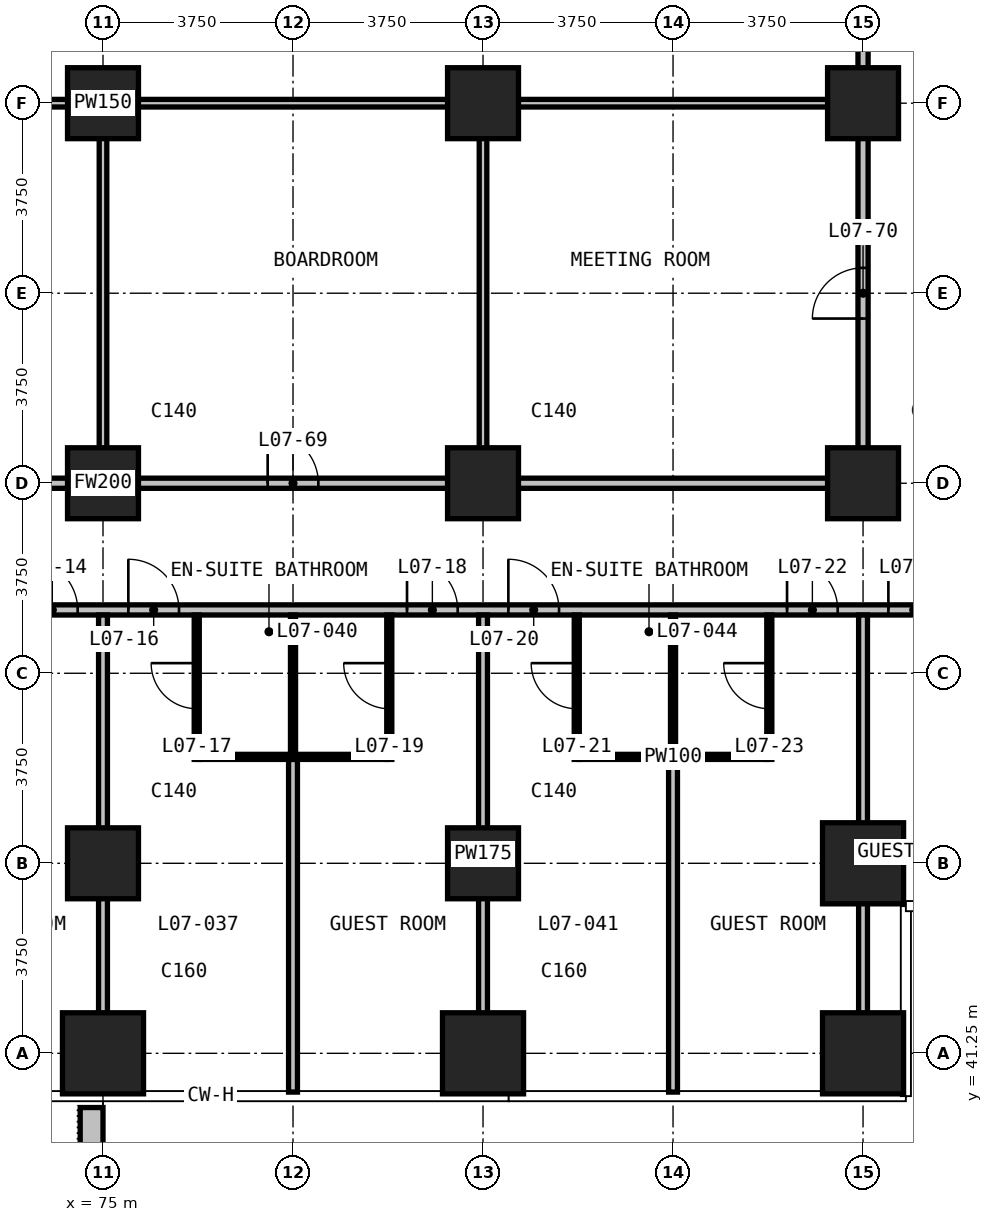
"""IFC4 building model, lengths in metres.
Left out: names, types, materials, properties, quantities, classifications, styles, units other than length and angle.
Written with IfcOpenShell. Run it as: python <this file> out.ifc"""

import sys

from ifc_helpers import new_model, si_unit, direction, frame, frame_2d, origin, origin_2d, place, context, subcontext, project, spatial, rectangle, extrude, element, fill, save


model = new_model("IFC4")
c1 = context("Model", 3, precision=1e-05, world=origin(), true_north=direction((0.0, 1.0)))
c2 = subcontext(c1, "Body", "Model", "MODEL_VIEW")
j1 = project(units=[si_unit("LENGTHUNIT", "METRE"), si_unit("PLANEANGLEUNIT", "RADIAN")], contexts=[c1])
p1 = place(None, origin())
s1 = spatial("IfcSite", under=j1, at=p1, CompositionType="ELEMENT")
p2 = place(p1, origin())
s2 = spatial("IfcBuilding", under=s1, at=p2, CompositionType="ELEMENT")
p3 = place(p2, frame((0.0, 0.0, 42.8)))
s3 = spatial("IfcBuildingStorey", under=s2, at=p3, CompositionType="ELEMENT", Elevation=42.8)
p4 = place(p3, frame((75.0, 41.25, 0.0), z_axis=(0.0, 0.0, 1.0), x_axis=(1.0, 0.0, 0.0)))
e1 = element("IfcColumn", 1, at=p4, inside=s3, PredefinedType="COLUMN", context=c2, shape_type="SweptSolid", body=[
    extrude(rectangle(XDim=1.6, YDim=1.6, at=origin_2d()), origin(), (0.0, 0.0, 1.0), 3.3),
])
for number, where, z_axis, x_axis in (
    (2, (75.0, 45.0, 0.0), (0.0, 0.0, 1.0), (1.0, 0.0, 0.0)),
    (3, (75.0, 52.5, 0.0), (0.0, 0.0, 1.0), (1.0, 0.0, 0.0)),
    (4, (75.0, 60.0, 0.0), (0.0, 0.0, 1.0), (1.0, 0.0, 0.0)),
):
    element("IfcColumn", number, at=place(p3, frame(where, z_axis=z_axis, x_axis=x_axis)), inside=s3, PredefinedType="COLUMN", context=c2, shape_type="SweptSolid", body=[
        extrude(rectangle(XDim=1.4, YDim=1.4, at=origin_2d()), origin(), (0.0, 0.0, 1.0), 3.3),
    ])
p5 = place(p3, frame((82.5, 41.25, 0.0), z_axis=(0.0, 0.0, 1.0), x_axis=(1.0, 0.0, 0.0)))
e5 = element("IfcColumn", 5, at=p5, inside=s3, PredefinedType="COLUMN", context=c2, shape_type="SweptSolid", body=[
    extrude(rectangle(XDim=1.6, YDim=1.6, at=origin_2d()), origin(), (0.0, 0.0, 1.0), 3.3),
])
for number, where, z_axis, x_axis in (
    (6, (82.5, 45.0, 0.0), (0.0, 0.0, 1.0), (1.0, 0.0, 0.0)),
    (7, (82.5, 52.5, 0.0), (0.0, 0.0, 1.0), (1.0, 0.0, 0.0)),
    (8, (82.5, 60.0, 0.0), (0.0, 0.0, 1.0), (1.0, 0.0, 0.0)),
):
    element("IfcColumn", number, at=place(p3, frame(where, z_axis=z_axis, x_axis=x_axis)), inside=s3, PredefinedType="COLUMN", context=c2, shape_type="SweptSolid", body=[
        extrude(rectangle(XDim=1.4, YDim=1.4, at=origin_2d()), origin(), (0.0, 0.0, 1.0), 3.3),
    ])
for number, where, z_axis, x_axis in (
    (9, (90.0, 41.25, 0.0), (0.0, 0.0, 1.0), (1.0, 0.0, 0.0)),
    (10, (90.0, 45.0, 0.0), (0.0, 0.0, 1.0), (1.0, 0.0, 0.0)),
):
    element("IfcColumn", number, at=place(p3, frame(where, z_axis=z_axis, x_axis=x_axis)), inside=s3, PredefinedType="COLUMN", context=c2, shape_type="SweptSolid", body=[
        extrude(rectangle(XDim=1.6, YDim=1.6, at=origin_2d()), origin(), (0.0, 0.0, 1.0), 3.3),
    ])
for number, where, z_axis, x_axis in (
    (11, (90.0, 52.5, 0.0), (0.0, 0.0, 1.0), (1.0, 0.0, 0.0)),
    (12, (90.0, 60.0, 0.0), (0.0, 0.0, 1.0), (1.0, 0.0, 0.0)),
):
    element("IfcColumn", number, at=place(p3, frame(where, z_axis=z_axis, x_axis=x_axis)), inside=s3, PredefinedType="COLUMN", context=c2, shape_type="SweptSolid", body=[
        extrude(rectangle(XDim=1.4, YDim=1.4, at=origin_2d()), origin(), (0.0, 0.0, 1.0), 3.3),
    ])
p6 = place(p3, frame((74.775, 40.18, 0.0), z_axis=(0.0, 0.0, 1.0), x_axis=(0.0, -1.0, 0.0)))
e13 = element("IfcWall", 13, at=p6, inside=s3, PredefinedType="USERDEFINED", context=c2, shape_type="SweptSolid", body=[
    extrude(rectangle(XDim=2.33, YDim=0.45, at=frame_2d((1.165, 0.0))), origin(), (0.0, 0.0, 1.0), 1.1),
])
p7 = place(p3, frame((52.575, 50.0, 0.0), z_axis=(0.0, 0.0, 1.0), x_axis=(1.0, 0.0, 0.0)))
e14 = element("IfcWall", 14, at=p7, inside=s3, PredefinedType="PARTITIONING", context=c2, shape_type="SweptSolid", body=[
    extrude(rectangle(XDim=44.85, YDim=0.2, at=frame_2d((22.425, 0.0))), origin(), (0.0, 0.0, 1.0), 3.0),
])
p8 = place(p7, frame((5.925, 0.0, 0.0)))
e15 = element("IfcOpeningElement", 15, at=p8, cuts=e14, PredefinedType="OPENING", context=c2, shape_type="SweptSolid", body=[
    extrude(rectangle(XDim=1.0, YDim=2.2, at=frame_2d((0.5, 1.1))), frame((0.0, 0.11, 0.0), z_axis=(0.0, -1.0, 0.0), x_axis=(1.0, 0.0, 0.0)), (0.0, 0.0, 1.0), 0.22),
])
p9 = place(p7, frame((7.925, 0.0, 0.0)))
e16 = element("IfcOpeningElement", 16, at=p9, cuts=e14, PredefinedType="OPENING", context=c2, shape_type="SweptSolid", body=[
    extrude(rectangle(XDim=1.0, YDim=2.2, at=frame_2d((0.5, 1.1))), frame((0.0, 0.11, 0.0), z_axis=(0.0, -1.0, 0.0), x_axis=(1.0, 0.0, 0.0)), (0.0, 0.0, 1.0), 0.22),
])
p10 = place(p7, frame((13.425, 0.0, 0.0)))
e17 = element("IfcOpeningElement", 17, at=p10, cuts=e14, PredefinedType="OPENING", context=c2, shape_type="SweptSolid", body=[
    extrude(rectangle(XDim=1.0, YDim=2.2, at=frame_2d((0.5, 1.1))), frame((0.0, 0.11, 0.0), z_axis=(0.0, -1.0, 0.0), x_axis=(1.0, 0.0, 0.0)), (0.0, 0.0, 1.0), 0.22),
])
p11 = place(p7, frame((15.425, 0.0, 0.0)))
e18 = element("IfcOpeningElement", 18, at=p11, cuts=e14, PredefinedType="OPENING", context=c2, shape_type="SweptSolid", body=[
    extrude(rectangle(XDim=1.0, YDim=2.2, at=frame_2d((0.5, 1.1))), frame((0.0, 0.11, 0.0), z_axis=(0.0, -1.0, 0.0), x_axis=(1.0, 0.0, 0.0)), (0.0, 0.0, 1.0), 0.22),
])
p12 = place(p7, frame((20.925, 0.0, 0.0)))
e19 = element("IfcOpeningElement", 19, at=p12, cuts=e14, PredefinedType="OPENING", context=c2, shape_type="SweptSolid", body=[
    extrude(rectangle(XDim=1.0, YDim=2.2, at=frame_2d((0.5, 1.1))), frame((0.0, 0.11, 0.0), z_axis=(0.0, -1.0, 0.0), x_axis=(1.0, 0.0, 0.0)), (0.0, 0.0, 1.0), 0.22),
])
p13 = place(p7, frame((22.925, 0.0, 0.0)))
e20 = element("IfcOpeningElement", 20, at=p13, cuts=e14, PredefinedType="OPENING", context=c2, shape_type="SweptSolid", body=[
    extrude(rectangle(XDim=1.0, YDim=2.2, at=frame_2d((0.5, 1.1))), frame((0.0, 0.11, 0.0), z_axis=(0.0, -1.0, 0.0), x_axis=(1.0, 0.0, 0.0)), (0.0, 0.0, 1.0), 0.22),
])
p14 = place(p7, frame((28.425, 0.0, 0.0)))
e21 = element("IfcOpeningElement", 21, at=p14, cuts=e14, PredefinedType="OPENING", context=c2, shape_type="SweptSolid", body=[
    extrude(rectangle(XDim=1.0, YDim=2.2, at=frame_2d((0.5, 1.1))), frame((0.0, 0.11, 0.0), z_axis=(0.0, -1.0, 0.0), x_axis=(1.0, 0.0, 0.0)), (0.0, 0.0, 1.0), 0.22),
])
p15 = place(p7, frame((30.425, 0.0, 0.0)))
e22 = element("IfcOpeningElement", 22, at=p15, cuts=e14, PredefinedType="OPENING", context=c2, shape_type="SweptSolid", body=[
    extrude(rectangle(XDim=1.0, YDim=2.2, at=frame_2d((0.5, 1.1))), frame((0.0, 0.11, 0.0), z_axis=(0.0, -1.0, 0.0), x_axis=(1.0, 0.0, 0.0)), (0.0, 0.0, 1.0), 0.22),
])
p16 = place(p7, frame((35.925, 0.0, 0.0)))
e23 = element("IfcOpeningElement", 23, at=p16, cuts=e14, PredefinedType="OPENING", context=c2, shape_type="SweptSolid", body=[
    extrude(rectangle(XDim=1.0, YDim=2.2, at=frame_2d((0.5, 1.1))), frame((0.0, 0.11, 0.0), z_axis=(0.0, -1.0, 0.0), x_axis=(1.0, 0.0, 0.0)), (0.0, 0.0, 1.0), 0.22),
])
p17 = place(p7, frame((37.925, 0.0, 0.0)))
e24 = element("IfcOpeningElement", 24, at=p17, cuts=e14, PredefinedType="OPENING", context=c2, shape_type="SweptSolid", body=[
    extrude(rectangle(XDim=1.0, YDim=2.2, at=frame_2d((0.5, 1.1))), frame((0.0, 0.11, 0.0), z_axis=(0.0, -1.0, 0.0), x_axis=(1.0, 0.0, 0.0)), (0.0, 0.0, 1.0), 0.22),
])
p18 = place(p7, frame((1.4, 0.0, 0.0)))
e25 = element("IfcOpeningElement", 25, at=p18, cuts=e14, PredefinedType="OPENING", context=c2, shape_type="SweptSolid", body=[
    extrude(rectangle(XDim=0.9, YDim=2.2, at=frame_2d((0.45, 1.1))), frame((0.0, 0.11, 0.0), z_axis=(0.0, -1.0, 0.0), x_axis=(1.0, 0.0, 0.0)), (0.0, 0.0, 1.0), 0.22),
])
p19 = place(p7, frame((42.575, 0.0, 0.0)))
e26 = element("IfcOpeningElement", 26, at=p19, cuts=e14, PredefinedType="OPENING", context=c2, shape_type="SweptSolid", body=[
    extrude(rectangle(XDim=0.9, YDim=2.2, at=frame_2d((0.45, 1.1))), frame((0.0, 0.11, 0.0), z_axis=(0.0, -1.0, 0.0), x_axis=(1.0, 0.0, 0.0)), (0.0, 0.0, 1.0), 0.22),
])
p20 = place(p3, frame((60.1, 52.5, 0.0), z_axis=(0.0, 0.0, 1.0), x_axis=(1.0, 0.0, 0.0)))
e27 = element("IfcWall", 27, at=p20, inside=s3, PredefinedType="PARTITIONING", context=c2, shape_type="SweptSolid", body=[
    extrude(rectangle(XDim=29.8, YDim=0.2, at=frame_2d((14.9, 0.0))), origin(), (0.0, 0.0, 1.0), 3.0),
])
p21 = place(p20, frame((10.65, 0.0, 0.0)))
e28 = element("IfcOpeningElement", 28, at=p21, cuts=e27, PredefinedType="OPENING", context=c2, shape_type="SweptSolid", body=[
    extrude(rectangle(XDim=1.0, YDim=2.2, at=frame_2d((0.5, 1.1))), frame((0.0, 0.11, 0.0), z_axis=(0.0, -1.0, 0.0), x_axis=(1.0, 0.0, 0.0)), (0.0, 0.0, 1.0), 0.22),
])
p22 = place(p20, frame((18.15, 0.0, 0.0)))
e29 = element("IfcOpeningElement", 29, at=p22, cuts=e27, PredefinedType="OPENING", context=c2, shape_type="SweptSolid", body=[
    extrude(rectangle(XDim=1.0, YDim=2.2, at=frame_2d((0.5, 1.1))), frame((0.0, 0.11, 0.0), z_axis=(0.0, -1.0, 0.0), x_axis=(1.0, 0.0, 0.0)), (0.0, 0.0, 1.0), 0.22),
])
p23 = place(p3, frame((90.0, 52.4, 0.0), z_axis=(0.0, 0.0, 1.0), x_axis=(0.0, 1.0, 0.0)))
e30 = element("IfcWall", 30, at=p23, inside=s3, PredefinedType="PARTITIONING", context=c2, shape_type="SweptSolid", body=[
    extrude(rectangle(XDim=18.84, YDim=0.2, at=frame_2d((9.42, 0.0))), origin(), (0.0, 0.0, 1.0), 3.0),
])
p24 = place(p23, frame((3.35, 0.0, 0.0)))
e31 = element("IfcOpeningElement", 31, at=p24, cuts=e30, PredefinedType="OPENING", context=c2, shape_type="SweptSolid", body=[
    extrude(rectangle(XDim=1.0, YDim=2.2, at=frame_2d((0.5, 1.1))), frame((0.0, 0.11, 0.0), z_axis=(0.0, -1.0, 0.0), x_axis=(1.0, 0.0, 0.0)), (0.0, 0.0, 1.0), 0.22),
])
p25 = place(p23, frame((12.3, 0.0, 0.0)))
e32 = element("IfcOpeningElement", 32, at=p25, cuts=e30, PredefinedType="OPENING", context=c2, shape_type="SweptSolid", body=[
    extrude(rectangle(XDim=1.8, YDim=2.2, at=frame_2d((0.9, 1.1))), frame((0.0, 0.11, 0.0), z_axis=(0.0, -1.0, 0.0), x_axis=(1.0, 0.0, 0.0)), (0.0, 0.0, 1.0), 0.22),
])
p26 = place(p3, frame((75.0, 40.485, 0.0), z_axis=(0.0, 0.0, 1.0), x_axis=(0.0, 1.0, 0.0)))
e33 = element("IfcWall", 33, at=p26, inside=s3, PredefinedType="PARTITIONING", context=c2, shape_type="SweptSolid", body=[
    extrude(rectangle(XDim=9.415, YDim=0.175, at=frame_2d((4.708, 0.0))), origin(), (0.0, 0.0, 1.0), 3.0),
])
p27 = place(p3, frame((78.75, 40.485, 0.0), z_axis=(0.0, 0.0, 1.0), x_axis=(0.0, 1.0, 0.0)))
e34 = element("IfcWall", 34, at=p27, inside=s3, PredefinedType="PARTITIONING", context=c2, shape_type="SweptSolid", body=[
    extrude(rectangle(XDim=6.565, YDim=0.175, at=frame_2d((3.282, 0.0))), origin(), (0.0, 0.0, 1.0), 3.0),
])
p28 = place(p3, frame((82.5, 40.485, 0.0), z_axis=(0.0, 0.0, 1.0), x_axis=(0.0, 1.0, 0.0)))
e35 = element("IfcWall", 35, at=p28, inside=s3, PredefinedType="PARTITIONING", context=c2, shape_type="SweptSolid", body=[
    extrude(rectangle(XDim=9.415, YDim=0.175, at=frame_2d((4.708, 0.0))), origin(), (0.0, 0.0, 1.0), 3.0),
])
p29 = place(p3, frame((86.25, 40.485, 0.0), z_axis=(0.0, 0.0, 1.0), x_axis=(0.0, 1.0, 0.0)))
e36 = element("IfcWall", 36, at=p29, inside=s3, PredefinedType="PARTITIONING", context=c2, shape_type="SweptSolid", body=[
    extrude(rectangle(XDim=6.565, YDim=0.175, at=frame_2d((3.282, 0.0))), origin(), (0.0, 0.0, 1.0), 3.0),
])
p30 = place(p3, frame((90.0, 40.485, 0.0), z_axis=(0.0, 0.0, 1.0), x_axis=(0.0, 1.0, 0.0)))
e37 = element("IfcWall", 37, at=p30, inside=s3, PredefinedType="PARTITIONING", context=c2, shape_type="SweptSolid", body=[
    extrude(rectangle(XDim=9.415, YDim=0.175, at=frame_2d((4.708, 0.0))), origin(), (0.0, 0.0, 1.0), 3.0),
])
p31 = place(p3, frame((60.1, 60.0, 0.0), z_axis=(0.0, 0.0, 1.0), x_axis=(1.0, 0.0, 0.0)))
e38 = element("IfcWall", 38, at=p31, inside=s3, PredefinedType="PARTITIONING", context=c2, shape_type="SweptSolid", body=[
    extrude(rectangle(XDim=29.8, YDim=0.15, at=frame_2d((14.9, 0.0))), origin(), (0.0, 0.0, 1.0), 3.0),
])
for number, where, z_axis, x_axis in (
    (39, (75.0, 52.6, 0.0), (0.0, 0.0, 1.0), (0.0, 1.0, 0.0)),
    (40, (82.5, 52.6, 0.0), (0.0, 0.0, 1.0), (0.0, 1.0, 0.0)),
):
    element("IfcWall", number, at=place(p3, frame(where, z_axis=z_axis, x_axis=x_axis)), inside=s3, PredefinedType="PARTITIONING", context=c2, shape_type="SweptSolid", body=[
        extrude(rectangle(XDim=7.325, YDim=0.15, at=frame_2d((3.663, 0.0))), origin(), (0.0, 0.0, 1.0), 3.0),
    ])
for number, where, z_axis, x_axis in (
    (41, (76.9, 47.1, 0.0), (0.0, 0.0, 1.0), (1.0, 0.0, 0.0)),
    (42, (84.4, 47.1, 0.0), (0.0, 0.0, 1.0), (1.0, 0.0, 0.0)),
):
    element("IfcWall", number, at=place(p3, frame(where, z_axis=z_axis, x_axis=x_axis)), inside=s3, PredefinedType="PARTITIONING", context=c2, shape_type="SweptSolid", body=[
        extrude(rectangle(XDim=3.7, YDim=0.1, at=frame_2d((1.85, 0.0))), origin(), (0.0, 0.0, 1.0), 3.0),
    ])
p32 = place(p3, frame((76.85, 47.05, 0.0), z_axis=(0.0, 0.0, 1.0), x_axis=(0.0, 1.0, 0.0)))
e43 = element("IfcWall", 43, at=p32, inside=s3, PredefinedType="PARTITIONING", context=c2, shape_type="SweptSolid", body=[
    extrude(rectangle(XDim=2.85, YDim=0.1, at=frame_2d((1.425, 0.0))), origin(), (0.0, 0.0, 1.0), 3.0),
])
p33 = place(p32, frame((1.0, 0.0, 0.0)))
e44 = element("IfcOpeningElement", 44, at=p33, cuts=e43, PredefinedType="OPENING", context=c2, shape_type="SweptSolid", body=[
    extrude(rectangle(XDim=0.9, YDim=2.2, at=frame_2d((0.45, 1.1))), frame((0.0, 0.06, 0.0), z_axis=(0.0, -1.0, 0.0), x_axis=(1.0, 0.0, 0.0)), (0.0, 0.0, 1.0), 0.12),
])
p34 = place(p3, frame((78.75, 47.15, 0.0), z_axis=(0.0, 0.0, 1.0), x_axis=(0.0, 1.0, 0.0)))
e45 = element("IfcWall", 45, at=p34, inside=s3, PredefinedType="PARTITIONING", context=c2, shape_type="SweptSolid", body=[
    extrude(rectangle(XDim=2.75, YDim=0.1, at=frame_2d((1.375, 0.0))), origin(), (0.0, 0.0, 1.0), 3.0),
])
p35 = place(p3, frame((80.65, 47.05, 0.0), z_axis=(0.0, 0.0, 1.0), x_axis=(0.0, 1.0, 0.0)))
e46 = element("IfcWall", 46, at=p35, inside=s3, PredefinedType="PARTITIONING", context=c2, shape_type="SweptSolid", body=[
    extrude(rectangle(XDim=2.85, YDim=0.1, at=frame_2d((1.425, 0.0))), origin(), (0.0, 0.0, 1.0), 3.0),
])
p36 = place(p35, frame((1.0, 0.0, 0.0)))
e47 = element("IfcOpeningElement", 47, at=p36, cuts=e46, PredefinedType="OPENING", context=c2, shape_type="SweptSolid", body=[
    extrude(rectangle(XDim=0.9, YDim=2.2, at=frame_2d((0.45, 1.1))), frame((0.0, 0.06, 0.0), z_axis=(0.0, -1.0, 0.0), x_axis=(1.0, 0.0, 0.0)), (0.0, 0.0, 1.0), 0.12),
])
p37 = place(p3, frame((84.35, 47.05, 0.0), z_axis=(0.0, 0.0, 1.0), x_axis=(0.0, 1.0, 0.0)))
e48 = element("IfcWall", 48, at=p37, inside=s3, PredefinedType="PARTITIONING", context=c2, shape_type="SweptSolid", body=[
    extrude(rectangle(XDim=2.85, YDim=0.1, at=frame_2d((1.425, 0.0))), origin(), (0.0, 0.0, 1.0), 3.0),
])
p38 = place(p37, frame((1.0, 0.0, 0.0)))
e49 = element("IfcOpeningElement", 49, at=p38, cuts=e48, PredefinedType="OPENING", context=c2, shape_type="SweptSolid", body=[
    extrude(rectangle(XDim=0.9, YDim=2.2, at=frame_2d((0.45, 1.1))), frame((0.0, 0.06, 0.0), z_axis=(0.0, -1.0, 0.0), x_axis=(1.0, 0.0, 0.0)), (0.0, 0.0, 1.0), 0.12),
])
p39 = place(p3, frame((86.25, 47.15, 0.0), z_axis=(0.0, 0.0, 1.0), x_axis=(0.0, 1.0, 0.0)))
e50 = element("IfcWall", 50, at=p39, inside=s3, PredefinedType="PARTITIONING", context=c2, shape_type="SweptSolid", body=[
    extrude(rectangle(XDim=2.75, YDim=0.1, at=frame_2d((1.375, 0.0))), origin(), (0.0, 0.0, 1.0), 3.0),
])
p40 = place(p3, frame((88.15, 47.05, 0.0), z_axis=(0.0, 0.0, 1.0), x_axis=(0.0, 1.0, 0.0)))
e51 = element("IfcWall", 51, at=p40, inside=s3, PredefinedType="PARTITIONING", context=c2, shape_type="SweptSolid", body=[
    extrude(rectangle(XDim=2.85, YDim=0.1, at=frame_2d((1.425, 0.0))), origin(), (0.0, 0.0, 1.0), 3.0),
])
p41 = place(p40, frame((1.0, 0.0, 0.0)))
e52 = element("IfcOpeningElement", 52, at=p41, cuts=e51, PredefinedType="OPENING", context=c2, shape_type="SweptSolid", body=[
    extrude(rectangle(XDim=0.9, YDim=2.2, at=frame_2d((0.45, 1.1))), frame((0.0, 0.06, 0.0), z_axis=(0.0, -1.0, 0.0), x_axis=(1.0, 0.0, 0.0)), (0.0, 0.0, 1.0), 0.12),
])
p42 = place(p12, origin())
e53 = element("IfcDoor", 53, at=p42, inside=s3, OperationType="SINGLE_SWING_LEFT", PredefinedType="DOOR", context=c2, shape_type="SweptSolid", body=[
    extrude(rectangle(XDim=1.0, YDim=2.2, at=frame_2d((0.5, 1.1))), frame((0.0, 0.025, 0.0), z_axis=(0.0, -1.0, 0.0), x_axis=(1.0, 0.0, 0.0)), (0.0, 0.0, 1.0), 0.05),
])
fill(e19, e53)
p43 = place(p13, origin())
e54 = element("IfcDoor", 54, at=p43, inside=s3, OperationType="SINGLE_SWING_LEFT", PredefinedType="DOOR", context=c2, shape_type="SweptSolid", body=[
    extrude(rectangle(XDim=1.0, YDim=2.2, at=frame_2d((0.5, 1.1))), frame((0.0, 0.025, 0.0), z_axis=(0.0, -1.0, 0.0), x_axis=(1.0, 0.0, 0.0)), (0.0, 0.0, 1.0), 0.05),
])
fill(e20, e54)
p44 = place(p33, origin())
e55 = element("IfcDoor", 55, at=p44, inside=s3, OperationType="SINGLE_SWING_RIGHT", PredefinedType="DOOR", context=c2, shape_type="SweptSolid", body=[
    extrude(rectangle(XDim=0.9, YDim=2.2, at=frame_2d((0.45, 1.1))), frame((0.0, 0.025, 0.0), z_axis=(0.0, -1.0, 0.0), x_axis=(1.0, 0.0, 0.0)), (0.0, 0.0, 1.0), 0.05),
])
fill(e44, e55)
p45 = place(p14, origin())
e56 = element("IfcDoor", 56, at=p45, inside=s3, OperationType="SINGLE_SWING_LEFT", PredefinedType="DOOR", context=c2, shape_type="SweptSolid", body=[
    extrude(rectangle(XDim=1.0, YDim=2.2, at=frame_2d((0.5, 1.1))), frame((0.0, 0.025, 0.0), z_axis=(0.0, -1.0, 0.0), x_axis=(1.0, 0.0, 0.0)), (0.0, 0.0, 1.0), 0.05),
])
fill(e21, e56)
p46 = place(p36, origin())
e57 = element("IfcDoor", 57, at=p46, inside=s3, OperationType="SINGLE_SWING_RIGHT", PredefinedType="DOOR", context=c2, shape_type="SweptSolid", body=[
    extrude(rectangle(XDim=0.9, YDim=2.2, at=frame_2d((0.45, 1.1))), frame((0.0, 0.025, 0.0), z_axis=(0.0, -1.0, 0.0), x_axis=(1.0, 0.0, 0.0)), (0.0, 0.0, 1.0), 0.05),
])
fill(e47, e57)
p47 = place(p15, origin())
e58 = element("IfcDoor", 58, at=p47, inside=s3, OperationType="SINGLE_SWING_RIGHT", PredefinedType="DOOR", context=c2, shape_type="SweptSolid", body=[
    extrude(rectangle(XDim=1.0, YDim=2.2, at=frame_2d((0.5, 1.1))), frame((0.0, 0.025, 0.0), z_axis=(0.0, -1.0, 0.0), x_axis=(1.0, 0.0, 0.0)), (0.0, 0.0, 1.0), 0.05),
])
fill(e22, e58)
p48 = place(p38, origin())
e59 = element("IfcDoor", 59, at=p48, inside=s3, OperationType="SINGLE_SWING_RIGHT", PredefinedType="DOOR", context=c2, shape_type="SweptSolid", body=[
    extrude(rectangle(XDim=0.9, YDim=2.2, at=frame_2d((0.45, 1.1))), frame((0.0, 0.025, 0.0), z_axis=(0.0, -1.0, 0.0), x_axis=(1.0, 0.0, 0.0)), (0.0, 0.0, 1.0), 0.05),
])
fill(e49, e59)
p49 = place(p16, origin())
e60 = element("IfcDoor", 60, at=p49, inside=s3, OperationType="SINGLE_SWING_LEFT", PredefinedType="DOOR", context=c2, shape_type="SweptSolid", body=[
    extrude(rectangle(XDim=1.0, YDim=2.2, at=frame_2d((0.5, 1.1))), frame((0.0, 0.025, 0.0), z_axis=(0.0, -1.0, 0.0), x_axis=(1.0, 0.0, 0.0)), (0.0, 0.0, 1.0), 0.05),
])
fill(e23, e60)
p50 = place(p41, origin())
e61 = element("IfcDoor", 61, at=p50, inside=s3, OperationType="SINGLE_SWING_RIGHT", PredefinedType="DOOR", context=c2, shape_type="SweptSolid", body=[
    extrude(rectangle(XDim=0.9, YDim=2.2, at=frame_2d((0.45, 1.1))), frame((0.0, 0.025, 0.0), z_axis=(0.0, -1.0, 0.0), x_axis=(1.0, 0.0, 0.0)), (0.0, 0.0, 1.0), 0.05),
])
fill(e52, e61)
p51 = place(p17, origin())
e62 = element("IfcDoor", 62, at=p51, inside=s3, OperationType="SINGLE_SWING_LEFT", PredefinedType="DOOR", context=c2, shape_type="SweptSolid", body=[
    extrude(rectangle(XDim=1.0, YDim=2.2, at=frame_2d((0.5, 1.1))), frame((0.0, 0.025, 0.0), z_axis=(0.0, -1.0, 0.0), x_axis=(1.0, 0.0, 0.0)), (0.0, 0.0, 1.0), 0.05),
])
fill(e24, e62)
p52 = place(p22, origin())
e63 = element("IfcDoor", 63, at=p52, inside=s3, OperationType="SINGLE_SWING_LEFT", PredefinedType="DOOR", context=c2, shape_type="SweptSolid", body=[
    extrude(rectangle(XDim=1.0, YDim=2.2, at=frame_2d((0.5, 1.1))), frame((0.0, 0.025, 0.0), z_axis=(0.0, -1.0, 0.0), x_axis=(1.0, 0.0, 0.0)), (0.0, 0.0, 1.0), 0.05),
])
fill(e29, e63)
p53 = place(p24, origin())
e64 = element("IfcDoor", 64, at=p53, inside=s3, OperationType="SINGLE_SWING_RIGHT", PredefinedType="DOOR", context=c2, shape_type="SweptSolid", body=[
    extrude(rectangle(XDim=1.0, YDim=2.2, at=frame_2d((0.5, 1.1))), frame((0.0, 0.025, 0.0), z_axis=(0.0, -1.0, 0.0), x_axis=(1.0, 0.0, 0.0)), (0.0, 0.0, 1.0), 0.05),
])
fill(e31, e64)
save(model, sys.argv[1])
